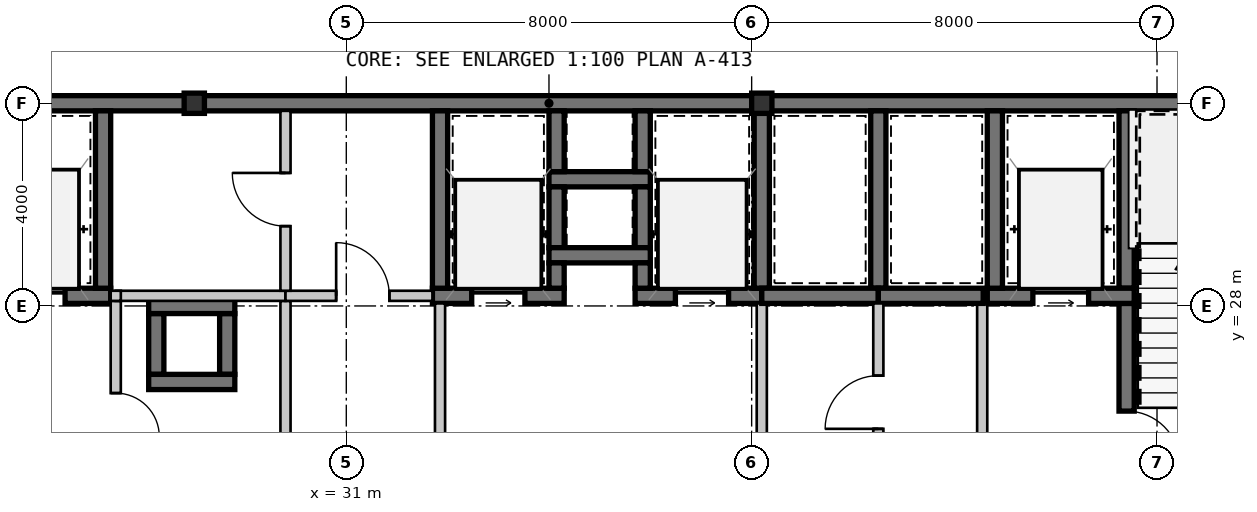
"""IFC4 building model, lengths in metres.
Left out: names, types, materials, properties, quantities, classifications, styles, units other than length and angle.
Written with IfcOpenShell. Run it as: python <this file> out.ifc"""

import sys

from ifc_helpers import new_model, si_unit, direction, frame, frame_2d, origin, origin_2d, place, context, subcontext, project, spatial, rectangle, hollow_rectangle, extrude, source, transform, mapped, element, fill, save


model = new_model("IFC4")
c1 = context("Model", 3, precision=1e-05, world=origin(), true_north=direction((0.0, 1.0)))
c2 = subcontext(c1, "Body", "Model", "MODEL_VIEW")
j1 = project(units=[si_unit("LENGTHUNIT", "METRE"), si_unit("PLANEANGLEUNIT", "RADIAN")], contexts=[c1])
p1 = place(None, origin())
s1 = spatial("IfcSite", under=j1, at=p1, CompositionType="ELEMENT")
p2 = place(p1, origin())
s2 = spatial("IfcBuilding", under=s1, at=p2, CompositionType="ELEMENT")
p3 = place(p2, frame((0.0, 0.0, 139.3)))
s3 = spatial("IfcBuildingStorey", under=s2, at=p3, CompositionType="ELEMENT", Elevation=139.3)
m1 = source(origin(), c2, "Body", "SweptSolid", [
    extrude(hollow_rectangle(XDim=0.4, YDim=0.4, WallThickness=0.016, at=origin_2d()), origin(), (0.0, 0.0, 1.0), 3.15),
])
for number, where, z_axis, x_axis in (
    (1, (28.0, 32.0, 0.0), (0.0, 0.0, 1.0), (1.0, 0.0, 0.0)),
    (2, (39.2, 32.0, 0.0), (0.0, 0.0, 1.0), (1.0, 0.0, 0.0)),
):
    element("IfcColumn", number, at=place(p3, frame(where, z_axis=z_axis, x_axis=x_axis)), inside=s3, PredefinedType="COLUMN", context=c2, shape_type="MappedRepresentation", body=[
        mapped(m1, transform((0.0, 0.0, 0.0), scale=1.0)),
    ])
m2 = source(origin(), c2, "Body", "SweptSolid", [
    extrude(rectangle(XDim=9.15, YDim=0.3, at=frame_2d((4.575, 0.0))), origin(), (0.0, 0.0, 1.0), 2.93),
])
p4 = place(p3, frame((18.85, 32.0, 0.0), z_axis=(0.0, 0.0, 1.0), x_axis=(1.0, 0.0, 0.0)))
e3 = element("IfcWall", 3, at=p4, inside=s3, PredefinedType="SHEAR", context=c2, shape_type="MappedRepresentation", body=[
    mapped(m2, transform((0.0, 0.0, 0.0), scale=1.0)),
])
m3 = source(origin(), c2, "Body", "SweptSolid", [
    extrude(rectangle(XDim=11.2, YDim=0.3, at=frame_2d((5.6, 0.0))), origin(), (0.0, 0.0, 1.0), 2.93),
])
p5 = place(p3, frame((28.0, 32.0, 0.0), z_axis=(0.0, 0.0, 1.0), x_axis=(1.0, 0.0, 0.0)))
e4 = element("IfcWall", 4, at=p5, inside=s3, PredefinedType="SHEAR", context=c2, shape_type="MappedRepresentation", body=[
    mapped(m3, transform((0.0, 0.0, 0.0), scale=1.0)),
])
m4 = source(origin(), c2, "Body", "SweptSolid", [
    extrude(rectangle(XDim=11.95, YDim=0.3, at=frame_2d((5.975, 0.0))), origin(), (0.0, 0.0, 1.0), 2.93),
])
p6 = place(p3, frame((39.2, 32.0, 0.0), z_axis=(0.0, 0.0, 1.0), x_axis=(1.0, 0.0, 0.0)))
e5 = element("IfcWall", 5, at=p6, inside=s3, PredefinedType="SHEAR", context=c2, shape_type="MappedRepresentation", body=[
    mapped(m4, transform((0.0, 0.0, 0.0), scale=1.0)),
])
m5 = source(origin(), c2, "Body", "SweptSolid", [
    extrude(rectangle(XDim=2.9, YDim=0.3, at=frame_2d((1.45, 0.0))), origin(), (0.0, 0.0, 1.0), 2.93),
])
p7 = place(p3, frame((23.45, 28.2, 0.0), z_axis=(0.0, 0.0, 1.0), x_axis=(1.0, 0.0, 0.0)))
e6 = element("IfcWall", 6, at=p7, inside=s3, PredefinedType="SHEAR", context=c2, shape_type="MappedRepresentation", body=[
    mapped(m5, transform((0.0, 0.0, 0.0), scale=1.0)),
])
m6 = source(origin(), c2, "Body", "SweptSolid", [
    extrude(rectangle(XDim=1.1, YDim=2.15, at=frame_2d((0.55, 1.075))), frame((0.0, 0.16, 0.0), z_axis=(0.0, -1.0, 0.0), x_axis=(1.0, 0.0, 0.0)), (0.0, 0.0, 1.0), 0.32),
])
p8 = place(p7, frame((0.9, 0.0, 0.0)))
e7 = element("IfcOpeningElement", 7, at=p8, cuts=e6, PredefinedType="OPENING", context=c2, shape_type="MappedRepresentation", body=[
    mapped(m6, transform((0.0, 0.0, 0.0), scale=1.0)),
])
m7 = source(origin(), c2, "Body", "SweptSolid", [
    extrude(rectangle(XDim=3.5, YDim=0.3, at=frame_2d((1.75, 0.0))), origin(), (0.0, 0.0, 1.0), 2.93),
])
p9 = place(p3, frame((26.2, 28.35, 0.0), z_axis=(0.0, 0.0, 1.0), x_axis=(0.0, 1.0, 0.0)))
e8 = element("IfcWall", 8, at=p9, inside=s3, PredefinedType="SHEAR", context=c2, shape_type="MappedRepresentation", body=[
    mapped(m7, transform((0.0, 0.0, 0.0), scale=1.0)),
])
m8 = source(origin(), c2, "Body", "SweptSolid", [
    extrude(rectangle(XDim=4.0, YDim=0.2, at=frame_2d((2.0, 0.0))), origin(), (0.0, 0.0, 1.0), 2.93),
])
p10 = place(p3, frame((26.45, 24.1, 0.0), z_axis=(0.0, 0.0, 1.0), x_axis=(0.0, 1.0, 0.0)))
e9 = element("IfcWall", 9, at=p10, inside=s3, PredefinedType="SOLIDWALL", context=c2, shape_type="MappedRepresentation", body=[
    mapped(m8, transform((0.0, 0.0, 0.0), scale=1.0)),
])
m9 = source(origin(), c2, "Body", "SweptSolid", [
    extrude(rectangle(XDim=0.86, YDim=2.1, at=frame_2d((0.43, 1.05))), frame((0.0, 0.11, 0.0), z_axis=(0.0, -1.0, 0.0), x_axis=(1.0, 0.0, 0.0)), (0.0, 0.0, 1.0), 0.22),
])
p11 = place(p10, frame((1.32, 0.0, 0.0)))
e10 = element("IfcOpeningElement", 10, at=p11, cuts=e9, PredefinedType="OPENING", context=c2, shape_type="MappedRepresentation", body=[
    mapped(m9, transform((0.0, 0.0, 0.0), scale=1.0)),
])
p12 = place(p3, frame((46.4, 31.85, 0.0), z_axis=(0.0, 0.0, 1.0), x_axis=(0.0, -1.0, 0.0)))
e11 = element("IfcWall", 11, at=p12, inside=s3, PredefinedType="SHEAR", context=c2, shape_type="MappedRepresentation", body=[
    mapped(m7, transform((0.0, 0.0, 0.0), scale=1.0)),
])
m10 = source(origin(), c2, "Body", "SweptSolid", [
    extrude(rectangle(XDim=3.9, YDim=0.3, at=frame_2d((1.95, 0.0))), origin(), (0.0, 0.0, 1.0), 2.93),
])
p13 = place(p3, frame((46.4, 28.05, 0.0), z_axis=(0.0, 0.0, 1.0), x_axis=(0.0, -1.0, 0.0)))
e12 = element("IfcWall", 12, at=p13, inside=s3, PredefinedType="SHEAR", context=c2, shape_type="MappedRepresentation", body=[
    mapped(m10, transform((0.0, 0.0, 0.0), scale=1.0)),
])
m11 = source(origin(), c2, "Body", "SweptSolid", [
    extrude(rectangle(XDim=1.05, YDim=2.1, at=frame_2d((0.525, 1.05))), frame((0.0, 0.16, 0.0), z_axis=(0.0, -1.0, 0.0), x_axis=(1.0, 0.0, 0.0)), (0.0, 0.0, 1.0), 0.32),
])
p14 = place(p13, frame((2.125, 0.0, 0.0)))
e13 = element("IfcOpeningElement", 13, at=p14, cuts=e12, PredefinedType="OPENING", context=c2, shape_type="MappedRepresentation", body=[
    mapped(m11, transform((0.0, 0.0, 0.0), scale=1.0)),
])
p15 = place(p3, frame((43.65, 28.2, 0.0), z_axis=(0.0, 0.0, 1.0), x_axis=(1.0, 0.0, 0.0)))
e14 = element("IfcWall", 14, at=p15, inside=s3, PredefinedType="SHEAR", context=c2, shape_type="MappedRepresentation", body=[
    mapped(m5, transform((0.0, 0.0, 0.0), scale=1.0)),
])
p16 = place(p15, frame((0.9, 0.0, 0.0)))
e15 = element("IfcOpeningElement", 15, at=p16, cuts=e14, PredefinedType="OPENING", context=c2, shape_type="MappedRepresentation", body=[
    mapped(m6, transform((0.0, 0.0, 0.0), scale=1.0)),
])
p17 = place(p3, frame((43.8, 31.85, 0.0), z_axis=(0.0, 0.0, 1.0), x_axis=(0.0, -1.0, 0.0)))
e16 = element("IfcWall", 16, at=p17, inside=s3, PredefinedType="SHEAR", context=c2, shape_type="MappedRepresentation", body=[
    mapped(m7, transform((0.0, 0.0, 0.0), scale=1.0)),
])
m12 = source(origin(), c2, "Body", "SweptSolid", [
    extrude(rectangle(XDim=3.95, YDim=0.2, at=frame_2d((1.975, 0.0))), origin(), (0.0, 0.0, 1.0), 2.93),
])
p18 = place(p3, frame((43.55, 28.05, 0.0), z_axis=(0.0, 0.0, 1.0), x_axis=(0.0, -1.0, 0.0)))
e17 = element("IfcWall", 17, at=p18, inside=s3, PredefinedType="SOLIDWALL", context=c2, shape_type="MappedRepresentation", body=[
    mapped(m12, transform((0.0, 0.0, 0.0), scale=1.0)),
])
m13 = source(origin(), c2, "Body", "SweptSolid", [
    extrude(rectangle(XDim=2.0, YDim=0.3, at=frame_2d((1.0, 0.0))), origin(), (0.0, 0.0, 1.0), 2.93),
])
p19 = place(p3, frame((35.0, 30.5, 0.0), z_axis=(0.0, 0.0, 1.0), x_axis=(1.0, 0.0, 0.0)))
e18 = element("IfcWall", 18, at=p19, inside=s3, PredefinedType="SHEAR", context=c2, shape_type="MappedRepresentation", body=[
    mapped(m13, transform((0.0, 0.0, 0.0), scale=1.0)),
])
m14 = source(origin(), c2, "Body", "SweptSolid", [
    extrude(rectangle(XDim=1.2, YDim=0.3, at=frame_2d((0.6, 0.0))), origin(), (0.0, 0.0, 1.0), 2.93),
])
for number, where, z_axis, x_axis in (
    (19, (35.15, 31.85, 0.0), (0.0, 0.0, 1.0), (0.0, -1.0, 0.0)),
    (20, (36.85, 30.65, 0.0), (0.0, 0.0, 1.0), (0.0, 1.0, 0.0)),
    (21, (35.15, 30.35, 0.0), (0.0, 0.0, 1.0), (0.0, -1.0, 0.0)),
    (22, (36.85, 29.15, 0.0), (0.0, 0.0, 1.0), (0.0, 1.0, 0.0)),
):
    element("IfcWall", number, at=place(p3, frame(where, z_axis=z_axis, x_axis=x_axis)), inside=s3, PredefinedType="SHEAR", context=c2, shape_type="MappedRepresentation", body=[
        mapped(m14, transform((0.0, 0.0, 0.0), scale=1.0)),
    ])
p20 = place(p3, frame((35.0, 29.0, 0.0), z_axis=(0.0, 0.0, 1.0), x_axis=(1.0, 0.0, 0.0)))
e23 = element("IfcWall", 23, at=p20, inside=s3, PredefinedType="SHEAR", context=c2, shape_type="MappedRepresentation", body=[
    mapped(m13, transform((0.0, 0.0, 0.0), scale=1.0)),
])
for number, where, z_axis, x_axis in (
    (24, (28.65, 26.65, 0.0), (0.0, 0.0, 1.0), (0.0, 1.0, 0.0)),
    (25, (27.25, 27.85, 0.0), (0.0, 0.0, 1.0), (0.0, -1.0, 0.0)),
):
    element("IfcWall", number, at=place(p3, frame(where, z_axis=z_axis, x_axis=x_axis)), inside=s3, PredefinedType="SHEAR", context=c2, shape_type="MappedRepresentation", body=[
        mapped(m14, transform((0.0, 0.0, 0.0), scale=1.0)),
    ])
m15 = source(origin(), c2, "Body", "SweptSolid", [
    extrude(rectangle(XDim=1.7, YDim=0.3, at=frame_2d((0.85, 0.0))), origin(), (0.0, 0.0, 1.0), 2.93),
])
for number, where, z_axis, x_axis in (
    (26, (28.8, 28.0, 0.0), (0.0, 0.0, 1.0), (-1.0, 0.0, 0.0)),
    (27, (27.1, 26.5, 0.0), (0.0, 0.0, 1.0), (1.0, 0.0, 0.0)),
):
    element("IfcWall", number, at=place(p3, frame(where, z_axis=z_axis, x_axis=x_axis)), inside=s3, PredefinedType="SHEAR", context=c2, shape_type="MappedRepresentation", body=[
        mapped(m15, transform((0.0, 0.0, 0.0), scale=1.0)),
    ])
m16 = source(origin(), c2, "Body", "SweptSolid", [
    extrude(rectangle(XDim=2.6, YDim=0.3, at=frame_2d((1.3, 0.0))), origin(), (0.0, 0.0, 1.0), 2.93),
])
p21 = place(p3, frame((32.7, 28.2, 0.0), z_axis=(0.0, 0.0, 1.0), x_axis=(1.0, 0.0, 0.0)))
e28 = element("IfcWall", 28, at=p21, inside=s3, PredefinedType="SHEAR", context=c2, shape_type="MappedRepresentation", body=[
    mapped(m16, transform((0.0, 0.0, 0.0), scale=1.0)),
])
m17 = source(origin(), c2, "Body", "SweptSolid", [
    extrude(rectangle(XDim=1.05, YDim=2.15, at=frame_2d((0.525, 1.075))), frame((0.0, 0.16, 0.0), z_axis=(0.0, -1.0, 0.0), x_axis=(1.0, 0.0, 0.0)), (0.0, 0.0, 1.0), 0.32),
])
p22 = place(p21, frame((0.775, 0.0, 0.0)))
e29 = element("IfcOpeningElement", 29, at=p22, cuts=e28, PredefinedType="OPENING", context=c2, shape_type="MappedRepresentation", body=[
    mapped(m17, transform((0.0, 0.0, 0.0), scale=1.0)),
])
m18 = source(origin(), c2, "Body", "SweptSolid", [
    extrude(rectangle(XDim=0.5, YDim=0.3, at=frame_2d((0.25, 0.0))), origin(), (0.0, 0.0, 1.0), 2.93),
])
p23 = place(p3, frame((35.15, 28.35, 0.0), z_axis=(0.0, 0.0, 1.0), x_axis=(0.0, 1.0, 0.0)))
e30 = element("IfcWall", 30, at=p23, inside=s3, PredefinedType="SHEAR", context=c2, shape_type="MappedRepresentation", body=[
    mapped(m18, transform((0.0, 0.0, 0.0), scale=1.0)),
])
p24 = place(p3, frame((32.85, 31.85, 0.0), z_axis=(0.0, 0.0, 1.0), x_axis=(0.0, -1.0, 0.0)))
e31 = element("IfcWall", 31, at=p24, inside=s3, PredefinedType="SHEAR", context=c2, shape_type="MappedRepresentation", body=[
    mapped(m7, transform((0.0, 0.0, 0.0), scale=1.0)),
])
m19 = source(origin(), c2, "Body", "SweptSolid", [
    extrude(rectangle(XDim=2.5, YDim=0.3, at=frame_2d((1.25, 0.0))), origin(), (0.0, 0.0, 1.0), 2.93),
])
p25 = place(p3, frame((36.7, 28.2, 0.0), z_axis=(0.0, 0.0, 1.0), x_axis=(1.0, 0.0, 0.0)))
e32 = element("IfcWall", 32, at=p25, inside=s3, PredefinedType="SHEAR", context=c2, shape_type="MappedRepresentation", body=[
    mapped(m19, transform((0.0, 0.0, 0.0), scale=1.0)),
])
p26 = place(p25, frame((0.795, 0.0, 0.0)))
e33 = element("IfcOpeningElement", 33, at=p26, cuts=e32, PredefinedType="OPENING", context=c2, shape_type="MappedRepresentation", body=[
    mapped(m17, transform((0.0, 0.0, 0.0), scale=1.0)),
])
p27 = place(p3, frame((36.85, 28.85, 0.0), z_axis=(0.0, 0.0, 1.0), x_axis=(0.0, -1.0, 0.0)))
e34 = element("IfcWall", 34, at=p27, inside=s3, PredefinedType="SHEAR", context=c2, shape_type="MappedRepresentation", body=[
    mapped(m18, transform((0.0, 0.0, 0.0), scale=1.0)),
])
p28 = place(p3, frame((39.2, 28.35, 0.0), z_axis=(0.0, 0.0, 1.0), x_axis=(0.0, 1.0, 0.0)))
e35 = element("IfcWall", 35, at=p28, inside=s3, PredefinedType="SHEAR", context=c2, shape_type="MappedRepresentation", body=[
    mapped(m7, transform((0.0, 0.0, 0.0), scale=1.0)),
])
p29 = place(p3, frame((32.85, 24.1, 0.0), z_axis=(0.0, 0.0, 1.0), x_axis=(0.0, 1.0, 0.0)))
e36 = element("IfcWall", 36, at=p29, inside=s3, PredefinedType="SOLIDWALL", context=c2, shape_type="MappedRepresentation", body=[
    mapped(m12, transform((0.0, 0.0, 0.0), scale=1.0)),
])
m20 = source(origin(), c2, "Body", "SweptSolid", [
    extrude(rectangle(XDim=3.95, YDim=0.2, at=frame_2d((1.975, 0.0))), origin(), (0.0, 0.0, 1.0), 2.47),
])
p30 = place(p3, frame((39.2, 28.05, 0.0), z_axis=(0.0, 0.0, 1.0), x_axis=(0.0, -1.0, 0.0)))
e37 = element("IfcWall", 37, at=p30, inside=s3, PredefinedType="SOLIDWALL", context=c2, shape_type="MappedRepresentation", body=[
    mapped(m20, transform((0.0, 0.0, 0.0), scale=1.0)),
])
p31 = place(p3, frame((41.5, 28.35, 0.0), z_axis=(0.0, 0.0, 1.0), x_axis=(0.0, 1.0, 0.0)))
e38 = element("IfcWall", 38, at=p31, inside=s3, PredefinedType="SHEAR", context=c2, shape_type="MappedRepresentation", body=[
    mapped(m7, transform((0.0, 0.0, 0.0), scale=1.0)),
])
m21 = source(origin(), c2, "Body", "SweptSolid", [
    extrude(rectangle(XDim=2.3, YDim=0.3, at=frame_2d((1.15, 0.0))), origin(), (0.0, 0.0, 1.0), 2.93),
])
p32 = place(p3, frame((39.2, 28.2, 0.0), z_axis=(0.0, 0.0, 1.0), x_axis=(1.0, 0.0, 0.0)))
e39 = element("IfcWall", 39, at=p32, inside=s3, PredefinedType="SHEAR", context=c2, shape_type="MappedRepresentation", body=[
    mapped(m21, transform((0.0, 0.0, 0.0), scale=1.0)),
])
m22 = source(origin(), c2, "Body", "SweptSolid", [
    extrude(rectangle(XDim=2.07, YDim=0.3, at=frame_2d((1.035, 0.0))), origin(), (0.0, 0.0, 1.0), 2.93),
])
p33 = place(p3, frame((41.5, 28.2, 0.0), z_axis=(0.0, 0.0, 1.0), x_axis=(1.0, 0.0, 0.0)))
e40 = element("IfcWall", 40, at=p33, inside=s3, PredefinedType="SHEAR", context=c2, shape_type="MappedRepresentation", body=[
    mapped(m22, transform((0.0, 0.0, 0.0), scale=1.0)),
])
p34 = place(p3, frame((29.8, 28.1, 0.0), z_axis=(0.0, 0.0, 1.0), x_axis=(0.0, -1.0, 0.0)))
e41 = element("IfcWall", 41, at=p34, inside=s3, PredefinedType="SOLIDWALL", context=c2, shape_type="MappedRepresentation", body=[
    mapped(m8, transform((0.0, 0.0, 0.0), scale=1.0)),
])
m23 = source(origin(), c2, "Body", "SweptSolid", [
    extrude(rectangle(XDim=3.35, YDim=0.2, at=frame_2d((1.675, 0.0))), origin(), (0.0, 0.0, 1.0), 2.93),
])
p35 = place(p3, frame((26.45, 28.2, 0.0), z_axis=(0.0, 0.0, 1.0), x_axis=(1.0, 0.0, 0.0)))
e42 = element("IfcWall", 42, at=p35, inside=s3, PredefinedType="SOLIDWALL", context=c2, shape_type="MappedRepresentation", body=[
    mapped(m23, transform((0.0, 0.0, 0.0), scale=1.0)),
])
m24 = source(origin(), c2, "Body", "SweptSolid", [
    extrude(rectangle(XDim=2.9, YDim=0.2, at=frame_2d((1.45, 0.0))), origin(), (0.0, 0.0, 1.0), 2.93),
])
p36 = place(p3, frame((29.8, 28.2, 0.0), z_axis=(0.0, 0.0, 1.0), x_axis=(1.0, 0.0, 0.0)))
e43 = element("IfcWall", 43, at=p36, inside=s3, PredefinedType="SOLIDWALL", context=c2, shape_type="MappedRepresentation", body=[
    mapped(m24, transform((0.0, 0.0, 0.0), scale=1.0)),
])
m25 = source(origin(), c2, "Body", "SweptSolid", [
    extrude(rectangle(XDim=1.05, YDim=2.1, at=frame_2d((0.525, 1.05))), frame((0.0, 0.11, 0.0), z_axis=(0.0, -1.0, 0.0), x_axis=(1.0, 0.0, 0.0)), (0.0, 0.0, 1.0), 0.22),
])
p37 = place(p36, frame((1.0, 0.0, 0.0)))
e44 = element("IfcOpeningElement", 44, at=p37, cuts=e43, PredefinedType="OPENING", context=c2, shape_type="MappedRepresentation", body=[
    mapped(m25, transform((0.0, 0.0, 0.0), scale=1.0)),
])
m26 = source(origin(), c2, "Body", "SweptSolid", [
    extrude(rectangle(XDim=3.55, YDim=0.2, at=frame_2d((1.775, 0.0))), origin(), (0.0, 0.0, 1.0), 2.93),
])
p38 = place(p3, frame((29.8, 31.85, 0.0), z_axis=(0.0, 0.0, 1.0), x_axis=(0.0, -1.0, 0.0)))
e45 = element("IfcWall", 45, at=p38, inside=s3, PredefinedType="SOLIDWALL", context=c2, shape_type="MappedRepresentation", body=[
    mapped(m26, transform((0.0, 0.0, 0.0), scale=1.0)),
])
p39 = place(p38, frame((1.225, 0.0, 0.0)))
e46 = element("IfcOpeningElement", 46, at=p39, cuts=e45, PredefinedType="OPENING", context=c2, shape_type="MappedRepresentation", body=[
    mapped(m25, transform((0.0, 0.0, 0.0), scale=1.0)),
])
p40 = place(p3, frame((41.5, 28.05, 0.0), z_axis=(0.0, 0.0, 1.0), x_axis=(0.0, -1.0, 0.0)))
e47 = element("IfcWall", 47, at=p40, inside=s3, PredefinedType="SOLIDWALL", context=c2, shape_type="MappedRepresentation", body=[
    mapped(m12, transform((0.0, 0.0, 0.0), scale=1.0)),
])
p41 = place(p40, frame((1.425, 0.0, 0.0)))
e48 = element("IfcOpeningElement", 48, at=p41, cuts=e47, PredefinedType="OPENING", context=c2, shape_type="MappedRepresentation", body=[
    mapped(m25, transform((0.0, 0.0, 0.0), scale=1.0)),
])
m27 = source(origin(), c2, "Body", "SweptSolid", [
    extrude(rectangle(XDim=0.2, YDim=0.2, at=frame_2d((0.1, 0.0))), origin(), (0.0, 0.0, 1.0), 2.93),
])
p42 = place(p3, frame((26.35, 28.2, 0.0), z_axis=(0.0, 0.0, 1.0), x_axis=(1.0, 0.0, 0.0)))
e49 = element("IfcWall", 49, at=p42, inside=s3, PredefinedType="SOLIDWALL", context=c2, shape_type="MappedRepresentation", body=[
    mapped(m27, transform((0.0, 0.0, 0.0), scale=1.0)),
])
m28 = source(origin(), c2, "Body", "SweptSolid", [
    extrude(rectangle(XDim=1.1, YDim=2.15, at=frame_2d((0.55, 1.075))), frame((0.0, 0.025, 0.0), z_axis=(0.0, -1.0, 0.0), x_axis=(1.0, 0.0, 0.0)), (0.0, 0.0, 1.0), 0.05),
])
p43 = place(p8, origin())
e50 = element("IfcDoor", 50, at=p43, inside=s3, OperationType="SLIDING_TO_LEFT", PredefinedType="DOOR", context=c2, shape_type="MappedRepresentation", body=[
    mapped(m28, transform((0.0, 0.0, 0.0), scale=1.0)),
])
fill(e7, e50)
m29 = source(origin(), c2, "Body", "SweptSolid", [
    extrude(rectangle(XDim=1.05, YDim=2.1, at=frame_2d((0.525, 1.05))), frame((0.0, 0.025, 0.0), z_axis=(0.0, -1.0, 0.0), x_axis=(1.0, 0.0, 0.0)), (0.0, 0.0, 1.0), 0.05),
])
p44 = place(p14, origin())
e51 = element("IfcDoor", 51, at=p44, inside=s3, OperationType="SINGLE_SWING_RIGHT", PredefinedType="DOOR", context=c2, shape_type="MappedRepresentation", body=[
    mapped(m29, transform((0.0, 0.0, 0.0), scale=1.0)),
])
fill(e13, e51)
p45 = place(p16, origin())
e52 = element("IfcDoor", 52, at=p45, inside=s3, OperationType="SLIDING_TO_LEFT", PredefinedType="DOOR", context=c2, shape_type="MappedRepresentation", body=[
    mapped(m28, transform((0.0, 0.0, 0.0), scale=1.0)),
])
fill(e15, e52)
m30 = source(origin(), c2, "Body", "SweptSolid", [
    extrude(rectangle(XDim=1.05, YDim=2.15, at=frame_2d((0.525, 1.075))), frame((0.0, 0.025, 0.0), z_axis=(0.0, -1.0, 0.0), x_axis=(1.0, 0.0, 0.0)), (0.0, 0.0, 1.0), 0.05),
])
p46 = place(p22, origin())
e53 = element("IfcDoor", 53, at=p46, inside=s3, OperationType="SLIDING_TO_LEFT", PredefinedType="DOOR", context=c2, shape_type="MappedRepresentation", body=[
    mapped(m30, transform((0.0, 0.0, 0.0), scale=1.0)),
])
fill(e29, e53)
p47 = place(p26, origin())
e54 = element("IfcDoor", 54, at=p47, inside=s3, OperationType="SLIDING_TO_LEFT", PredefinedType="DOOR", context=c2, shape_type="MappedRepresentation", body=[
    mapped(m30, transform((0.0, 0.0, 0.0), scale=1.0)),
])
fill(e33, e54)
p48 = place(p37, origin())
e55 = element("IfcDoor", 55, at=p48, inside=s3, OperationType="SINGLE_SWING_LEFT", PredefinedType="DOOR", context=c2, shape_type="MappedRepresentation", body=[
    mapped(m29, transform((0.0, 0.0, 0.0), scale=1.0)),
])
fill(e44, e55)
p49 = place(p39, frame((1.05, 0.0, 0.0), z_axis=(0.0, 0.0, 1.0), x_axis=(-1.0, 0.0, 0.0)))
e56 = element("IfcDoor", 56, at=p49, inside=s3, OperationType="SINGLE_SWING_RIGHT", PredefinedType="DOOR", context=c2, shape_type="MappedRepresentation", body=[
    mapped(m29, transform((0.0, 0.0, 0.0), scale=1.0)),
])
fill(e46, e56)
p50 = place(p41, frame((1.05, 0.0, 0.0), z_axis=(0.0, 0.0, 1.0), x_axis=(-1.0, 0.0, 0.0)))
e57 = element("IfcDoor", 57, at=p50, inside=s3, OperationType="SINGLE_SWING_LEFT", PredefinedType="DOOR", context=c2, shape_type="MappedRepresentation", body=[
    mapped(m29, transform((0.0, 0.0, 0.0), scale=1.0)),
])
fill(e48, e57)
m31 = source(origin(), c2, "Body", "SweptSolid", [
    extrude(rectangle(XDim=0.86, YDim=2.1, at=frame_2d((0.43, 1.05))), frame((0.0, 0.025, 0.0), z_axis=(0.0, -1.0, 0.0), x_axis=(1.0, 0.0, 0.0)), (0.0, 0.0, 1.0), 0.05),
])
p51 = place(p11, frame((0.86, 0.0, 0.0), z_axis=(0.0, 0.0, 1.0), x_axis=(-1.0, 0.0, 0.0)))
e58 = element("IfcDoor", 58, at=p51, inside=s3, OperationType="SINGLE_SWING_RIGHT", PredefinedType="DOOR", context=c2, shape_type="MappedRepresentation", body=[
    mapped(m31, transform((0.0, 0.0, 0.0), scale=1.0)),
])
fill(e10, e58)
save(model, sys.argv[1])
